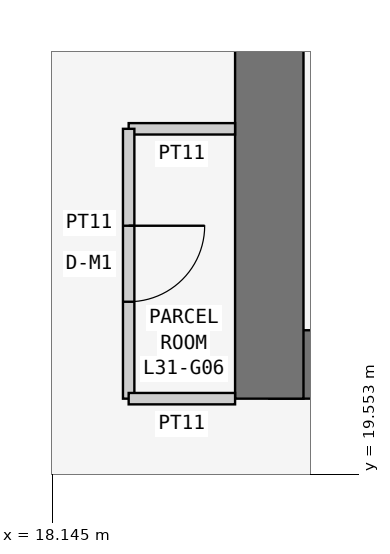
"""IFC4 building model, lengths in metres.
Left out: names, types, materials, properties, quantities, classifications, styles, units other than length and angle.
Written with IfcOpenShell. Run it as: python <this file> out.ifc"""

import sys

from ifc_helpers import new_model, si_unit, direction, frame, frame_2d, origin, place, context, subcontext, project, spatial, rectangle, extrude, element, fill, save


model = new_model("IFC4")
c1 = context("Model", 3, precision=1e-05, world=origin(), true_north=direction((0.0, 1.0)))
c2 = subcontext(c1, "Body", "Model", "MODEL_VIEW")
j1 = project(units=[si_unit("LENGTHUNIT", "METRE"), si_unit("PLANEANGLEUNIT", "RADIAN")], contexts=[c1])
p1 = place(None, origin())
s1 = spatial("IfcSite", under=j1, at=p1, CompositionType="ELEMENT")
p2 = place(p1, origin())
s2 = spatial("IfcBuilding", under=s1, at=p2, CompositionType="ELEMENT")
p3 = place(p2, frame((0.0, 0.0, 123.3)))
s3 = spatial("IfcBuildingStorey", under=s2, at=p3, CompositionType="ELEMENT", Elevation=123.3)
p4 = place(p3, frame((21.0, 21.0, 0.0), z_axis=(0.0, 0.0, 1.0), x_axis=(1.0, 0.0, 0.0)))
e1 = element("IfcWall", 1, at=p4, inside=s3, PredefinedType="SHEAR", context=c2, shape_type="SweptSolid", body=[
    extrude(rectangle(XDim=17.25, YDim=0.9, at=frame_2d((8.625, 0.0))), origin(), (0.0, 0.0, 1.0), 3.6),
])
p5 = place(p3, frame((21.0, 37.8, 0.0), z_axis=(0.0, 0.0, 1.0), x_axis=(0.0, -1.0, 0.0)))
e2 = element("IfcWall", 2, at=p5, inside=s3, PredefinedType="SHEAR", context=c2, shape_type="SweptSolid", body=[
    extrude(rectangle(XDim=17.25, YDim=0.9, at=frame_2d((8.625, 0.0))), origin(), (0.0, 0.0, 1.0), 3.6),
])
p6 = place(p5, frame((5.4, 0.0, 0.0)))
e3 = element("IfcOpeningElement", 3, at=p6, cuts=e2, PredefinedType="OPENING", context=c2, shape_type="SweptSolid", body=[
    extrude(rectangle(XDim=1.2, YDim=2.1, at=frame_2d((0.6, 1.05))), frame((0.0, 0.46, 0.0), z_axis=(0.0, -1.0, 0.0), x_axis=(1.0, 0.0, 0.0)), (0.0, 0.0, 1.0), 0.92),
])
p7 = place(p3, frame((20.55, 24.1, 0.0), z_axis=(0.0, 0.0, 1.0), x_axis=(-1.0, 0.0, 0.0)))
e4 = element("IfcWall", 4, at=p7, inside=s3, PredefinedType="PARTITIONING", context=c2, shape_type="SweptSolid", body=[
    extrude(rectangle(XDim=1.4, YDim=0.15, at=frame_2d((0.7, 0.0))), origin(), (0.0, 0.0, 1.0), 3.45),
])
p8 = place(p3, frame((19.15, 24.1, 0.0), z_axis=(0.0, 0.0, 1.0), x_axis=(0.0, -1.0, 0.0)))
e5 = element("IfcWall", 5, at=p8, inside=s3, PredefinedType="PARTITIONING", context=c2, shape_type="SweptSolid", body=[
    extrude(rectangle(XDim=3.55, YDim=0.15, at=frame_2d((1.775, 0.0))), origin(), (0.0, 0.0, 1.0), 3.45),
])
p9 = place(p8, frame((1.275, 0.0, 0.0)))
e6 = element("IfcOpeningElement", 6, at=p9, cuts=e5, PredefinedType="OPENING", context=c2, shape_type="SweptSolid", body=[
    extrude(rectangle(XDim=1.0, YDim=2.1, at=frame_2d((0.5, 1.05))), frame((0.0, 0.085, 0.0), z_axis=(0.0, -1.0, 0.0), x_axis=(1.0, 0.0, 0.0)), (0.0, 0.0, 1.0), 0.17),
])
p10 = place(p3, frame((19.15, 20.55, 0.0), z_axis=(0.0, 0.0, 1.0), x_axis=(1.0, 0.0, 0.0)))
e7 = element("IfcWall", 7, at=p10, inside=s3, PredefinedType="PARTITIONING", context=c2, shape_type="SweptSolid", body=[
    extrude(rectangle(XDim=1.4, YDim=0.15, at=frame_2d((0.7, 0.0))), origin(), (0.0, 0.0, 1.0), 3.45),
])
p11 = place(p9, origin())
e8 = element("IfcDoor", 8, at=p11, inside=s3, OperationType="SINGLE_SWING_LEFT", PredefinedType="DOOR", context=c2, shape_type="SweptSolid", body=[
    extrude(rectangle(XDim=1.0, YDim=2.1, at=frame_2d((0.5, 1.05))), frame((0.0, 0.025, 0.0), z_axis=(0.0, -1.0, 0.0), x_axis=(1.0, 0.0, 0.0)), (0.0, 0.0, 1.0), 0.05),
])
fill(e6, e8)
save(model, sys.argv[1])
